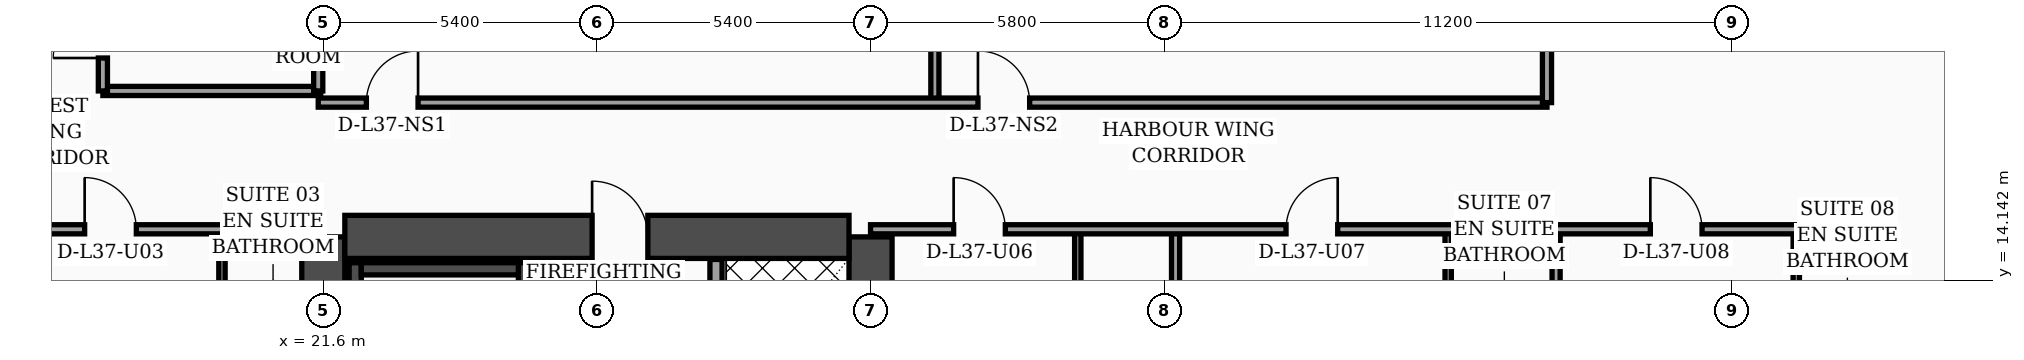
"""IFC4 building model, lengths in metres.
Left out: names, types, materials, properties, quantities, classifications, styles, units other than length and angle.
Written with IfcOpenShell. Run it as: python <this file> out.ifc"""

import sys

from ifc_helpers import new_model, si_unit, direction, frame, frame_2d, origin, place, context, subcontext, project, spatial, rectangle, extrude, element, fill, save


model = new_model("IFC4")
c1 = context("Model", 3, precision=1e-05, world=origin(), true_north=direction((0.0, 1.0)))
c2 = subcontext(c1, "Body", "Model", "MODEL_VIEW")
j1 = project(units=[si_unit("LENGTHUNIT", "METRE"), si_unit("PLANEANGLEUNIT", "RADIAN")], contexts=[c1])
p1 = place(None, origin())
s1 = spatial("IfcSite", under=j1, at=p1, CompositionType="ELEMENT")
p2 = place(p1, origin())
s2 = spatial("IfcBuilding", under=s1, at=p2, CompositionType="ELEMENT")
p3 = place(p2, frame((0.0, 0.0, 152.3)))
s3 = spatial("IfcBuildingStorey", under=s2, at=p3, CompositionType="ELEMENT", Elevation=152.3)
for number, where, z_axis, x_axis in (
    (1, (21.6, 4.6, 0.0), (0.0, 0.0, 1.0), (0.0, 1.0, 0.0)),
    (2, (32.4, 4.6, 0.0), (0.0, 0.0, 1.0), (0.0, 1.0, 0.0)),
):
    element("IfcWall", number, at=place(p3, frame(where, z_axis=z_axis, x_axis=x_axis)), inside=s3, PredefinedType="SHEAR", context=c2, shape_type="SweptSolid", body=[
        extrude(rectangle(XDim=10.4, YDim=0.85, at=frame_2d((5.2, 0.0))), origin(), (0.0, 0.0, 1.0), 3.56),
    ])
p4 = place(p3, frame((22.025, 15.0, 0.0), z_axis=(0.0, 0.0, 1.0), x_axis=(1.0, 0.0, 0.0)))
e3 = element("IfcWall", 3, at=p4, inside=s3, PredefinedType="SHEAR", context=c2, shape_type="SweptSolid", body=[
    extrude(rectangle(XDim=9.95, YDim=0.85, at=frame_2d((4.975, 0.0))), origin(), (0.0, 0.0, 1.0), 3.56),
])
p5 = place(p4, frame((4.88, 0.0, 0.0)))
e4 = element("IfcOpeningElement", 4, at=p5, cuts=e3, PredefinedType="OPENING", context=c2, shape_type="SweptSolid", body=[
    extrude(rectangle(XDim=1.1, YDim=2.2, at=frame_2d((0.55, 1.1))), frame((0.0, 0.435, 0.0), z_axis=(0.0, -1.0, 0.0), x_axis=(1.0, 0.0, 0.0)), (0.0, 0.0, 1.0), 0.87),
])
p6 = place(p3, frame((22.23, 5.025, 0.0), z_axis=(0.0, 0.0, 1.0), x_axis=(0.0, 1.0, 0.0)))
e5 = element("IfcWall", 5, at=p6, inside=s3, PredefinedType="SOLIDWALL", context=c2, shape_type="SweptSolid", body=[
    extrude(rectangle(XDim=9.465, YDim=0.24, at=frame_2d((4.732, 0.0))), origin(), (0.0, 0.0, 1.0), 3.56),
])
p7 = place(p3, frame((25.57, 5.025, 0.0), z_axis=(0.0, 0.0, 1.0), x_axis=(0.0, 1.0, 0.0)))
e6 = element("IfcWall", 6, at=p7, inside=s3, PredefinedType="SOLIDWALL", context=c2, shape_type="SweptSolid", body=[
    extrude(rectangle(XDim=9.465, YDim=0.24, at=frame_2d((4.732, 0.0))), origin(), (0.0, 0.0, 1.0), 3.56),
])
p8 = place(p7, frame((0.35, 0.0, 0.0)))
e7 = element("IfcOpeningElement", 7, at=p8, cuts=e6, PredefinedType="OPENING", context=c2, shape_type="SweptSolid", body=[
    extrude(rectangle(XDim=1.15, YDim=2.2, at=frame_2d((0.575, 1.1))), frame((0.0, 0.13, 0.0), z_axis=(0.0, -1.0, 0.0), x_axis=(1.0, 0.0, 0.0)), (0.0, 0.0, 1.0), 0.26),
])
p9 = place(p3, frame((22.35, 14.37, 0.0), z_axis=(0.0, 0.0, 1.0), x_axis=(1.0, 0.0, 0.0)))
e8 = element("IfcWall", 8, at=p9, inside=s3, PredefinedType="SOLIDWALL", context=c2, shape_type="SweptSolid", body=[
    extrude(rectangle(XDim=3.1, YDim=0.24, at=frame_2d((1.55, 0.0))), origin(), (0.0, 0.0, 1.0), 3.56),
])
p10 = place(p3, frame((59.23, 5.505, 0.0), z_axis=(0.0, 0.0, 1.0), x_axis=(-0.300509063924, 0.953778958931, 0.0)))
e9 = element("IfcWall", 9, at=p10, inside=s3, PredefinedType="SOLIDWALL", context=c2, shape_type="SweptSolid", body=[
    extrude(rectangle(XDim=30.814, YDim=0.32, at=frame_2d((15.407, 0.0))), origin(), (0.0, 0.0, 1.0), 3.56),
])
p11 = place(p10, frame((10.199, 0.0, 0.0)))
e10 = element("IfcOpeningElement", 10, at=p11, cuts=e9, PredefinedType="OPENING", context=c2, shape_type="SweptSolid", body=[
    extrude(rectangle(XDim=1.4, YDim=2.25, at=frame_2d((0.7, 1.125))), frame((0.0, 0.17, 0.0), z_axis=(0.0, -1.0, 0.0), x_axis=(1.0, 0.0, 0.0)), (0.0, 0.0, 1.0), 0.34),
])
p12 = place(p10, frame((1.6, 0.0, 0.75)))
e11 = element("IfcOpeningElement", 11, at=p12, cuts=e9, PredefinedType="OPENING", context=c2, shape_type="SweptSolid", body=[
    extrude(rectangle(XDim=1.5, YDim=1.6, at=frame_2d((0.75, 0.8))), frame((0.0, 0.17, 0.0), z_axis=(0.0, -1.0, 0.0), x_axis=(1.0, 0.0, 0.0)), (0.0, 0.0, 1.0), 0.34),
])
p13 = place(p10, frame((4.7, 0.0, 0.75)))
e12 = element("IfcOpeningElement", 12, at=p13, cuts=e9, PredefinedType="OPENING", context=c2, shape_type="SweptSolid", body=[
    extrude(rectangle(XDim=1.5, YDim=1.6, at=frame_2d((0.75, 0.8))), frame((0.0, 0.17, 0.0), z_axis=(0.0, -1.0, 0.0), x_axis=(1.0, 0.0, 0.0)), (0.0, 0.0, 1.0), 0.34),
])
p14 = place(p10, frame((7.8, 0.0, 0.75)))
e13 = element("IfcOpeningElement", 13, at=p14, cuts=e9, PredefinedType="OPENING", context=c2, shape_type="SweptSolid", body=[
    extrude(rectangle(XDim=1.5, YDim=1.6, at=frame_2d((0.75, 0.8))), frame((0.0, 0.17, 0.0), z_axis=(0.0, -1.0, 0.0), x_axis=(1.0, 0.0, 0.0)), (0.0, 0.0, 1.0), 0.34),
])
p15 = place(p10, frame((14.0, 0.0, 0.75)))
e14 = element("IfcOpeningElement", 14, at=p15, cuts=e9, PredefinedType="OPENING", context=c2, shape_type="SweptSolid", body=[
    extrude(rectangle(XDim=1.5, YDim=1.6, at=frame_2d((0.75, 0.8))), frame((0.0, 0.17, 0.0), z_axis=(0.0, -1.0, 0.0), x_axis=(1.0, 0.0, 0.0)), (0.0, 0.0, 1.0), 0.34),
])
p16 = place(p10, frame((17.1, 0.0, 0.75)))
e15 = element("IfcOpeningElement", 15, at=p16, cuts=e9, PredefinedType="OPENING", context=c2, shape_type="SweptSolid", body=[
    extrude(rectangle(XDim=1.5, YDim=1.6, at=frame_2d((0.75, 0.8))), frame((0.0, 0.17, 0.0), z_axis=(0.0, -1.0, 0.0), x_axis=(1.0, 0.0, 0.0)), (0.0, 0.0, 1.0), 0.34),
])
p17 = place(p10, frame((20.2, 0.0, 0.75)))
e16 = element("IfcOpeningElement", 16, at=p17, cuts=e9, PredefinedType="OPENING", context=c2, shape_type="SweptSolid", body=[
    extrude(rectangle(XDim=1.5, YDim=1.6, at=frame_2d((0.75, 0.8))), frame((0.0, 0.17, 0.0), z_axis=(0.0, -1.0, 0.0), x_axis=(1.0, 0.0, 0.0)), (0.0, 0.0, 1.0), 0.34),
])
p18 = place(p10, frame((23.3, 0.0, 0.75)))
e17 = element("IfcOpeningElement", 17, at=p18, cuts=e9, PredefinedType="OPENING", context=c2, shape_type="SweptSolid", body=[
    extrude(rectangle(XDim=1.5, YDim=1.6, at=frame_2d((0.75, 0.8))), frame((0.0, 0.17, 0.0), z_axis=(0.0, -1.0, 0.0), x_axis=(1.0, 0.0, 0.0)), (0.0, 0.0, 1.0), 0.34),
])
p19 = place(p10, frame((26.4, 0.0, 0.75)))
e18 = element("IfcOpeningElement", 18, at=p19, cuts=e9, PredefinedType="OPENING", context=c2, shape_type="SweptSolid", body=[
    extrude(rectangle(XDim=1.5, YDim=1.6, at=frame_2d((0.75, 0.8))), frame((0.0, 0.17, 0.0), z_axis=(0.0, -1.0, 0.0), x_axis=(1.0, 0.0, 0.0)), (0.0, 0.0, 1.0), 0.34),
])
p20 = place(p3, frame((29.35, 5.045, 0.0), z_axis=(0.0, 0.0, 1.0), x_axis=(0.0, 1.0, 0.0)))
e19 = element("IfcWall", 19, at=p20, inside=s3, PredefinedType="SOLIDWALL", context=c2, shape_type="SweptSolid", body=[
    extrude(rectangle(XDim=9.51, YDim=0.24, at=frame_2d((4.755, 0.0))), origin(), (0.0, 0.0, 1.0), 3.56),
])
p21 = place(p20, frame((0.55, 0.0, 0.0)))
e20 = element("IfcOpeningElement", 20, at=p21, cuts=e19, PredefinedType="OPENING", context=c2, shape_type="SweptSolid", body=[
    extrude(rectangle(XDim=1.3, YDim=2.35, at=frame_2d((0.65, 1.175))), frame((0.0, 0.13, 0.0), z_axis=(0.0, -1.0, 0.0), x_axis=(1.0, 0.0, 0.0)), (0.0, 0.0, 1.0), 0.26),
])
p22 = place(p3, frame((19.6, 2.44, 0.0), z_axis=(0.0, 0.0, 1.0), x_axis=(0.0, 1.0, 0.0)))
e21 = element("IfcWall", 21, at=p22, inside=s3, PredefinedType="PARTITIONING", context=c2, shape_type="SweptSolid", body=[
    extrude(rectangle(XDim=12.71, YDim=0.125, at=frame_2d((6.355, 0.0))), origin(), (0.0, 0.0, 1.0), 2.49),
])
p23 = place(p22, frame((4.34, 0.0, 0.0)))
e22 = element("IfcOpeningElement", 22, at=p23, cuts=e21, PredefinedType="OPENING", context=c2, shape_type="SweptSolid", body=[
    extrude(rectangle(XDim=0.96, YDim=2.2, at=frame_2d((0.48, 1.1))), frame((0.0, 0.073, 0.0), z_axis=(0.0, -1.0, 0.0), x_axis=(1.0, 0.0, 0.0)), (0.0, 0.0, 1.0), 0.145),
])
p24 = place(p22, frame((10.18, 0.0, 0.0)))
e23 = element("IfcOpeningElement", 23, at=p24, cuts=e21, PredefinedType="OPENING", context=c2, shape_type="SweptSolid", body=[
    extrude(rectangle(XDim=0.9, YDim=2.15, at=frame_2d((0.45, 1.075))), frame((0.0, 0.073, 0.0), z_axis=(0.0, -1.0, 0.0), x_axis=(1.0, 0.0, 0.0)), (0.0, 0.0, 1.0), 0.145),
])
p25 = place(p3, frame((15.15, 15.15, 0.0), z_axis=(0.0, 0.0, 1.0), x_axis=(1.0, 0.0, 0.0)))
e24 = element("IfcWall", 24, at=p25, inside=s3, PredefinedType="PARTITIONING", context=c2, shape_type="SweptSolid", body=[
    extrude(rectangle(XDim=6.45, YDim=0.18, at=frame_2d((3.225, 0.0))), origin(), (0.0, 0.0, 1.0), 2.49),
])
p26 = place(p25, frame((1.74, 0.0, 0.0)))
e25 = element("IfcOpeningElement", 25, at=p26, cuts=e24, PredefinedType="OPENING", context=c2, shape_type="SweptSolid", body=[
    extrude(rectangle(XDim=1.02, YDim=2.2, at=frame_2d((0.51, 1.1))), frame((0.0, 0.1, 0.0), z_axis=(0.0, -1.0, 0.0), x_axis=(1.0, 0.0, 0.0)), (0.0, 0.0, 1.0), 0.2),
])
p27 = place(p3, frame((17.25, 17.88, 0.0), z_axis=(0.0, 0.0, 1.0), x_axis=(1.0, 0.0, 0.0)))
e26 = element("IfcWall", 26, at=p27, inside=s3, PredefinedType="PARTITIONING", context=c2, shape_type="SweptSolid", body=[
    extrude(rectangle(XDim=4.3, YDim=0.18, at=frame_2d((2.15, 0.0))), origin(), (0.0, 0.0, 1.0), 3.09),
])
p28 = place(p3, frame((21.5, 17.88, 0.0), z_axis=(0.0, 0.0, 1.0), x_axis=(0.0, 1.0, 0.0)))
e27 = element("IfcWall", 27, at=p28, inside=s3, PredefinedType="PARTITIONING", context=c2, shape_type="SweptSolid", body=[
    extrude(rectangle(XDim=6.44, YDim=0.18, at=frame_2d((3.22, 0.0))), origin(), (0.0, 0.0, 1.0), 3.09),
])
p29 = place(p3, frame((17.25, 17.88, 0.0), z_axis=(0.0, 0.0, 1.0), x_axis=(0.0, 1.0, 0.0)))
e28 = element("IfcWall", 28, at=p29, inside=s3, PredefinedType="PARTITIONING", context=c2, shape_type="SweptSolid", body=[
    extrude(rectangle(XDim=6.44, YDim=0.18, at=frame_2d((3.22, 0.0))), origin(), (0.0, 0.0, 1.0), 3.09),
])
p30 = place(p29, frame((0.65, 0.0, 0.0)))
e29 = element("IfcOpeningElement", 29, at=p30, cuts=e28, PredefinedType="OPENING", context=c2, shape_type="SweptSolid", body=[
    extrude(rectangle(XDim=0.98, YDim=2.15, at=frame_2d((0.49, 1.075))), frame((0.0, 0.1, 0.0), z_axis=(0.0, -1.0, 0.0), x_axis=(1.0, 0.0, 0.0)), (0.0, 0.0, 1.0), 0.2),
])
p31 = place(p29, frame((3.27, 0.0, 0.0)))
e30 = element("IfcOpeningElement", 30, at=p31, cuts=e28, PredefinedType="OPENING", context=c2, shape_type="SweptSolid", body=[
    extrude(rectangle(XDim=0.96, YDim=2.2, at=frame_2d((0.48, 1.1))), frame((0.0, 0.1, 0.0), z_axis=(0.0, -1.0, 0.0), x_axis=(1.0, 0.0, 0.0)), (0.0, 0.0, 1.0), 0.2),
])
p32 = place(p3, frame((36.49, 2.44, 0.0), z_axis=(0.0, 0.0, 1.0), x_axis=(0.0, 1.0, 0.0)))
e31 = element("IfcWall", 31, at=p32, inside=s3, PredefinedType="PARTITIONING", context=c2, shape_type="SweptSolid", body=[
    extrude(rectangle(XDim=12.71, YDim=0.125, at=frame_2d((6.355, 0.0))), origin(), (0.0, 0.0, 1.0), 2.94),
])
p33 = place(p32, frame((4.35, 0.0, 0.0)))
e32 = element("IfcOpeningElement", 32, at=p33, cuts=e31, PredefinedType="OPENING", context=c2, shape_type="SweptSolid", body=[
    extrude(rectangle(XDim=0.96, YDim=2.2, at=frame_2d((0.48, 1.1))), frame((0.0, 0.073, 0.0), z_axis=(0.0, -1.0, 0.0), x_axis=(1.0, 0.0, 0.0)), (0.0, 0.0, 1.0), 0.145),
])
p34 = place(p32, frame((10.21, 0.0, 0.0)))
e33 = element("IfcOpeningElement", 33, at=p34, cuts=e31, PredefinedType="OPENING", context=c2, shape_type="SweptSolid", body=[
    extrude(rectangle(XDim=0.9, YDim=2.15, at=frame_2d((0.45, 1.075))), frame((0.0, 0.073, 0.0), z_axis=(0.0, -1.0, 0.0), x_axis=(1.0, 0.0, 0.0)), (0.0, 0.0, 1.0), 0.145),
])
p35 = place(p3, frame((43.8, 2.44, 0.0), z_axis=(0.0, 0.0, 1.0), x_axis=(0.0, 1.0, 0.0)))
e34 = element("IfcWall", 34, at=p35, inside=s3, PredefinedType="PARTITIONING", context=c2, shape_type="SweptSolid", body=[
    extrude(rectangle(XDim=12.71, YDim=0.125, at=frame_2d((6.355, 0.0))), origin(), (0.0, 0.0, 1.0), 3.04),
])
p36 = place(p35, frame((4.35, 0.0, 0.0)))
e35 = element("IfcOpeningElement", 35, at=p36, cuts=e34, PredefinedType="OPENING", context=c2, shape_type="SweptSolid", body=[
    extrude(rectangle(XDim=0.96, YDim=2.2, at=frame_2d((0.48, 1.1))), frame((0.0, 0.073, 0.0), z_axis=(0.0, -1.0, 0.0), x_axis=(1.0, 0.0, 0.0)), (0.0, 0.0, 1.0), 0.145),
])
p37 = place(p35, frame((10.21, 0.0, 0.0)))
e36 = element("IfcOpeningElement", 36, at=p37, cuts=e34, PredefinedType="OPENING", context=c2, shape_type="SweptSolid", body=[
    extrude(rectangle(XDim=0.9, YDim=2.15, at=frame_2d((0.45, 1.075))), frame((0.0, 0.073, 0.0), z_axis=(0.0, -1.0, 0.0), x_axis=(1.0, 0.0, 0.0)), (0.0, 0.0, 1.0), 0.145),
])
p38 = place(p3, frame((38.42, 2.44, 0.0), z_axis=(0.0, 0.0, 1.0), x_axis=(0.0, 1.0, 0.0)))
e37 = element("IfcWall", 37, at=p38, inside=s3, PredefinedType="PARTITIONING", context=c2, shape_type="SweptSolid", body=[
    extrude(rectangle(XDim=12.71, YDim=0.16, at=frame_2d((6.355, 0.0))), origin(), (0.0, 0.0, 1.0), 2.94),
])
p39 = place(p3, frame((50.67, 2.44, 0.0), z_axis=(0.0, 0.0, 1.0), x_axis=(0.0, 1.0, 0.0)))
e38 = element("IfcWall", 38, at=p39, inside=s3, PredefinedType="PARTITIONING", context=c2, shape_type="SweptSolid", body=[
    extrude(rectangle(XDim=12.71, YDim=0.125, at=frame_2d((6.355, 0.0))), origin(), (0.0, 0.0, 1.0), 3.04),
])
p40 = place(p39, frame((4.35, 0.0, 0.0)))
e39 = element("IfcOpeningElement", 39, at=p40, cuts=e38, PredefinedType="OPENING", context=c2, shape_type="SweptSolid", body=[
    extrude(rectangle(XDim=0.96, YDim=2.2, at=frame_2d((0.48, 1.1))), frame((0.0, 0.073, 0.0), z_axis=(0.0, -1.0, 0.0), x_axis=(1.0, 0.0, 0.0)), (0.0, 0.0, 1.0), 0.145),
])
p41 = place(p39, frame((10.21, 0.0, 0.0)))
e40 = element("IfcOpeningElement", 40, at=p41, cuts=e38, PredefinedType="OPENING", context=c2, shape_type="SweptSolid", body=[
    extrude(rectangle(XDim=0.9, YDim=2.15, at=frame_2d((0.45, 1.075))), frame((0.0, 0.073, 0.0), z_axis=(0.0, -1.0, 0.0), x_axis=(1.0, 0.0, 0.0)), (0.0, 0.0, 1.0), 0.145),
])
p42 = place(p3, frame((45.93, 2.44, 0.0), z_axis=(0.0, 0.0, 1.0), x_axis=(0.0, 1.0, 0.0)))
e41 = element("IfcWall", 41, at=p42, inside=s3, PredefinedType="PARTITIONING", context=c2, shape_type="SweptSolid", body=[
    extrude(rectangle(XDim=12.71, YDim=0.16, at=frame_2d((6.355, 0.0))), origin(), (0.0, 0.0, 1.0), 3.04),
])
p43 = place(p3, frame((32.4, 15.15, 0.0), z_axis=(0.0, 0.0, 1.0), x_axis=(1.0, 0.0, 0.0)))
e42 = element("IfcWall", 42, at=p43, inside=s3, PredefinedType="PARTITIONING", context=c2, shape_type="SweptSolid", body=[
    extrude(rectangle(XDim=20.2, YDim=0.18, at=frame_2d((10.1, 0.0))), origin(), (0.0, 0.0, 1.0), 2.94),
])
p44 = place(p43, frame((1.64, 0.0, 0.0)))
e43 = element("IfcOpeningElement", 43, at=p44, cuts=e42, PredefinedType="OPENING", context=c2, shape_type="SweptSolid", body=[
    extrude(rectangle(XDim=1.02, YDim=2.2, at=frame_2d((0.51, 1.1))), frame((0.0, 0.1, 0.0), z_axis=(0.0, -1.0, 0.0), x_axis=(1.0, 0.0, 0.0)), (0.0, 0.0, 1.0), 0.2),
])
p45 = place(p43, frame((8.2, 0.0, 0.0)))
e44 = element("IfcOpeningElement", 44, at=p45, cuts=e42, PredefinedType="OPENING", context=c2, shape_type="SweptSolid", body=[
    extrude(rectangle(XDim=1.02, YDim=2.2, at=frame_2d((0.51, 1.1))), frame((0.0, 0.1, 0.0), z_axis=(0.0, -1.0, 0.0), x_axis=(1.0, 0.0, 0.0)), (0.0, 0.0, 1.0), 0.2),
])
p46 = place(p43, frame((15.39, 0.0, 0.0)))
e45 = element("IfcOpeningElement", 45, at=p46, cuts=e42, PredefinedType="OPENING", context=c2, shape_type="SweptSolid", body=[
    extrude(rectangle(XDim=1.02, YDim=2.2, at=frame_2d((0.51, 1.1))), frame((0.0, 0.1, 0.0), z_axis=(0.0, -1.0, 0.0), x_axis=(1.0, 0.0, 0.0)), (0.0, 0.0, 1.0), 0.2),
])
p47 = place(p3, frame((33.67, 17.65, 0.0), z_axis=(0.0, 0.0, 1.0), x_axis=(0.0, 1.0, 0.0)))
e46 = element("IfcWall", 46, at=p47, inside=s3, PredefinedType="PARTITIONING", context=c2, shape_type="SweptSolid", body=[
    extrude(rectangle(XDim=13.56, YDim=0.16, at=frame_2d((6.78, 0.0))), origin(), (0.0, 0.0, 1.0), 2.94),
])
p48 = place(p3, frame((21.5, 17.65, 0.0), z_axis=(0.0, 0.0, 1.0), x_axis=(1.0, 0.0, 0.0)))
e47 = element("IfcWall", 47, at=p48, inside=s3, PredefinedType="PARTITIONING", context=c2, shape_type="SweptSolid", body=[
    extrude(rectangle(XDim=24.25, YDim=0.18, at=frame_2d((12.125, 0.0))), origin(), (0.0, 0.0, 1.0), 2.94),
])
p49 = place(p48, frame((0.95, 0.0, 0.0)))
e48 = element("IfcOpeningElement", 48, at=p49, cuts=e47, PredefinedType="OPENING", context=c2, shape_type="SweptSolid", body=[
    extrude(rectangle(XDim=1.02, YDim=2.2, at=frame_2d((0.51, 1.1))), frame((0.0, 0.1, 0.0), z_axis=(0.0, -1.0, 0.0), x_axis=(1.0, 0.0, 0.0)), (0.0, 0.0, 1.0), 0.2),
])
p50 = place(p48, frame((13.02, 0.0, 0.0)))
e49 = element("IfcOpeningElement", 49, at=p50, cuts=e47, PredefinedType="OPENING", context=c2, shape_type="SweptSolid", body=[
    extrude(rectangle(XDim=1.02, YDim=2.2, at=frame_2d((0.51, 1.1))), frame((0.0, 0.1, 0.0), z_axis=(0.0, -1.0, 0.0), x_axis=(1.0, 0.0, 0.0)), (0.0, 0.0, 1.0), 0.2),
])
p51 = place(p3, frame((45.75, 17.65, 0.0), z_axis=(0.0, 0.0, 1.0), x_axis=(0.0, 1.0, 0.0)))
e50 = element("IfcWall", 50, at=p51, inside=s3, PredefinedType="PARTITIONING", context=c2, shape_type="SweptSolid", body=[
    extrude(rectangle(XDim=20.29, YDim=0.18, at=frame_2d((10.145, 0.0))), origin(), (0.0, 0.0, 1.0), 2.94),
])
p52 = place(p26, origin())
e51 = element("IfcDoor", 51, at=p52, inside=s3, OperationType="SINGLE_SWING_LEFT", PredefinedType="DOOR", context=c2, shape_type="SweptSolid", body=[
    extrude(rectangle(XDim=1.02, YDim=2.2, at=frame_2d((0.51, 1.1))), frame((0.0, 0.025, 0.0), z_axis=(0.0, -1.0, 0.0), x_axis=(1.0, 0.0, 0.0)), (0.0, 0.0, 1.0), 0.05),
])
fill(e25, e51)
p53 = place(p30, origin())
e52 = element("IfcDoor", 52, at=p53, inside=s3, OperationType="SINGLE_SWING_LEFT", PredefinedType="DOOR", context=c2, shape_type="SweptSolid", body=[
    extrude(rectangle(XDim=0.98, YDim=2.15, at=frame_2d((0.49, 1.075))), frame((0.0, 0.025, 0.0), z_axis=(0.0, -1.0, 0.0), x_axis=(1.0, 0.0, 0.0)), (0.0, 0.0, 1.0), 0.05),
])
fill(e29, e52)
p54 = place(p44, origin())
e53 = element("IfcDoor", 53, at=p54, inside=s3, OperationType="SINGLE_SWING_LEFT", PredefinedType="DOOR", context=c2, shape_type="SweptSolid", body=[
    extrude(rectangle(XDim=1.02, YDim=2.2, at=frame_2d((0.51, 1.1))), frame((0.0, 0.025, 0.0), z_axis=(0.0, -1.0, 0.0), x_axis=(1.0, 0.0, 0.0)), (0.0, 0.0, 1.0), 0.05),
])
fill(e43, e53)
p55 = place(p45, origin())
e54 = element("IfcDoor", 54, at=p55, inside=s3, OperationType="SINGLE_SWING_RIGHT", PredefinedType="DOOR", context=c2, shape_type="SweptSolid", body=[
    extrude(rectangle(XDim=1.02, YDim=2.2, at=frame_2d((0.51, 1.1))), frame((0.0, 0.025, 0.0), z_axis=(0.0, -1.0, 0.0), x_axis=(1.0, 0.0, 0.0)), (0.0, 0.0, 1.0), 0.05),
])
fill(e44, e54)
p56 = place(p46, origin())
e55 = element("IfcDoor", 55, at=p56, inside=s3, OperationType="SINGLE_SWING_LEFT", PredefinedType="DOOR", context=c2, shape_type="SweptSolid", body=[
    extrude(rectangle(XDim=1.02, YDim=2.2, at=frame_2d((0.51, 1.1))), frame((0.0, 0.025, 0.0), z_axis=(0.0, -1.0, 0.0), x_axis=(1.0, 0.0, 0.0)), (0.0, 0.0, 1.0), 0.05),
])
fill(e45, e55)
p57 = place(p49, origin())
e56 = element("IfcDoor", 56, at=p57, inside=s3, OperationType="SINGLE_SWING_RIGHT", PredefinedType="DOOR", context=c2, shape_type="SweptSolid", body=[
    extrude(rectangle(XDim=1.02, YDim=2.2, at=frame_2d((0.51, 1.1))), frame((0.0, 0.025, 0.0), z_axis=(0.0, -1.0, 0.0), x_axis=(1.0, 0.0, 0.0)), (0.0, 0.0, 1.0), 0.05),
])
fill(e48, e56)
p58 = place(p50, origin())
e57 = element("IfcDoor", 57, at=p58, inside=s3, OperationType="SINGLE_SWING_LEFT", PredefinedType="DOOR", context=c2, shape_type="SweptSolid", body=[
    extrude(rectangle(XDim=1.02, YDim=2.2, at=frame_2d((0.51, 1.1))), frame((0.0, 0.025, 0.0), z_axis=(0.0, -1.0, 0.0), x_axis=(1.0, 0.0, 0.0)), (0.0, 0.0, 1.0), 0.05),
])
fill(e49, e57)
p59 = place(p5, origin())
e58 = element("IfcDoor", 58, at=p59, inside=s3, OperationType="SINGLE_SWING_LEFT", PredefinedType="DOOR", context=c2, shape_type="SweptSolid", body=[
    extrude(rectangle(XDim=1.1, YDim=2.2, at=frame_2d((0.55, 1.1))), frame((0.0, 0.025, 0.0), z_axis=(0.0, -1.0, 0.0), x_axis=(1.0, 0.0, 0.0)), (0.0, 0.0, 1.0), 0.05),
])
fill(e4, e58)
save(model, sys.argv[1])
